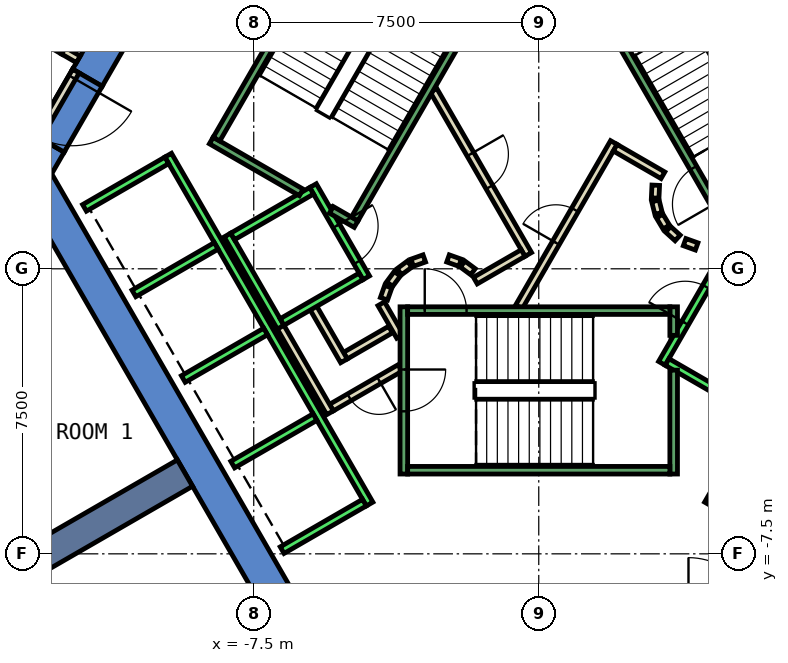
"""IFC4 building model, lengths in metres.
Left out: names, types, materials, properties, quantities, classifications, styles, units other than length and angle.
Written with IfcOpenShell. Run it as: python <this file> out.ifc"""

import sys

from ifc_helpers import new_model, si_unit, direction, frame, frame_2d, origin, place, context, subcontext, project, spatial, polyline, rectangle, outline, extrude, element, fill, save


model = new_model("IFC4")
c1 = context("Model", 3, precision=1e-05, world=origin(), true_north=direction((0.0, 1.0)))
c2 = subcontext(c1, "Body", "Model", "MODEL_VIEW")
j1 = project(units=[si_unit("LENGTHUNIT", "METRE"), si_unit("PLANEANGLEUNIT", "RADIAN")], contexts=[c1])
p1 = place(None, origin())
s1 = spatial("IfcSite", under=j1, at=p1, CompositionType="ELEMENT")
p2 = place(p1, origin())
s2 = spatial("IfcBuilding", under=s1, at=p2, CompositionType="ELEMENT")
p3 = place(p2, frame((0.0, 0.0, 86.6)))
s3 = spatial("IfcBuildingStorey", under=s2, at=p3, CompositionType="ELEMENT", Elevation=86.6)
p4 = place(p3, frame((0.0, 0.0, -0.6)))
e1 = element("IfcWall", 1, at=p4, inside=s3, PredefinedType="SHEAR", context=c2, shape_type="SweptSolid", body=[
    extrude(outline(polyline([(-12.267, 5.252), (-11.488, 4.802), (-6.409, 13.6), (-6.928, 14.5), (-12.267, 5.252)])), origin(), (0.0, 0.0, 1.0), 4.4),
])
p5 = place(p3, frame((0.0, 0.0, -0.6)))
e2 = element("IfcWall", 2, at=p5, inside=s3, PredefinedType="SHEAR", context=c2, shape_type="SweptSolid", body=[
    extrude(outline(polyline([(-12.488, 3.07), (-13.267, 3.52), (-13.856, 2.5), (-12.817, 2.5), (-12.488, 3.07)])), origin(), (0.0, 0.0, 1.0), 4.4),
])
p6 = place(p3, frame((0.0, 0.0, 3.6)))
e3 = element("IfcWall", 3, at=p6, inside=s3, PredefinedType="SHEAR", context=c2, shape_type="SweptSolid", body=[
    extrude(outline(polyline([(-13.267, 3.52), (-12.488, 3.07), (-11.488, 4.802), (-12.267, 5.252), (-13.267, 3.52)])), origin(), (0.0, 0.0, 1.0), 0.2),
])
p7 = place(p3, frame((0.0, 0.0, -0.6)))
e4 = element("IfcWall", 4, at=p7, inside=s3, PredefinedType="SHEAR", context=c2, shape_type="SweptSolid", body=[
    extrude(outline(polyline([(-13.856, 2.5), (-6.928, -9.5), (-6.409, -8.6), (-12.817, 2.5), (-13.856, 2.5)])), origin(), (0.0, 0.0, 1.0), 4.4),
])
p8 = place(p3, frame((-9.31, -5.375, -0.6), z_axis=(0.0, 0.0, 1.0), x_axis=(-0.866017533419, -0.500013631625, 0.0)))
e5 = element("IfcWall", 5, at=p8, inside=s3, PredefinedType="SHEAR", context=c2, shape_type="SweptSolid", body=[
    extrude(rectangle(XDim=9.0, YDim=0.8, at=frame_2d((4.5, 0.0))), origin(), (0.0, 0.0, 1.0), 4.4),
])
p9 = place(p3, frame((-15.098, 7.233, 0.0), z_axis=(0.0, 0.0, 1.0), x_axis=(0.866101363304, -0.499868411168, 0.0)))
e6 = element("IfcWall", 6, at=p9, inside=s3, PredefinedType="PARTITIONING", context=c2, shape_type="SweptSolid", body=[
    extrude(rectangle(XDim=2.992, YDim=0.2, at=frame_2d((1.496, 0.0))), origin(), (0.0, 0.0, 1.0), 3.8),
])
p10 = place(p3, frame((-3.9, -1.599, 0.0), z_axis=(0.0, 0.0, 1.0), x_axis=(-0.865969445389, -0.500096910261, 0.0)))
e7 = element("IfcWall", 7, at=p10, inside=s3, PredefinedType="PARTITIONING", context=c2, shape_type="SweptSolid", body=[
    extrude(rectangle(XDim=1.373, YDim=0.2, at=frame_2d((0.687, 0.0))), origin(), (0.0, 0.0, 1.0), 3.8),
])
p11 = place(p3, frame((-5.126, -2.422, 0.0), z_axis=(0.0, 0.0, 1.0), x_axis=(-0.500062241894, 0.865989465428, 0.0)))
e8 = element("IfcWall", 8, at=p11, inside=s3, PredefinedType="PARTITIONING", context=c2, shape_type="SweptSolid", body=[
    extrude(rectangle(XDim=1.7, YDim=0.2, at=frame_2d((0.85, 0.0))), origin(), (0.0, 0.0, 1.0), 3.8),
])
p12 = place(p3, frame((-3.65, -2.61, 0.0), z_axis=(0.0, 0.0, 1.0), x_axis=(-0.866072462134, -0.499918483688, 0.0)))
e9 = element("IfcWall", 9, at=p12, inside=s3, PredefinedType="PARTITIONING", context=c2, shape_type="SweptSolid", body=[
    extrude(rectangle(XDim=2.084, YDim=0.2, at=frame_2d((1.042, 0.0))), origin(), (0.0, 0.0, 1.0), 3.8),
])
p13 = place(p12, frame((0.642, 0.0, 0.0)))
e10 = element("IfcOpeningElement", 10, at=p13, cuts=e9, PredefinedType="OPENING", context=c2, shape_type="SweptSolid", body=[
    extrude(rectangle(XDim=0.9, YDim=2.1, at=frame_2d((0.45, 1.05))), frame((0.0, 0.11, 0.0), z_axis=(0.0, -1.0, 0.0), x_axis=(1.0, 0.0, 0.0)), (0.0, 0.0, 1.0), 0.22),
])
p14 = place(p3, frame((-5.492, -3.788, 0.0), z_axis=(0.0, 0.0, 1.0), x_axis=(-0.500008949224, 0.866020236886, 0.0)))
e11 = element("IfcWall", 11, at=p14, inside=s3, PredefinedType="PARTITIONING", context=c2, shape_type="SweptSolid", body=[
    extrude(rectangle(XDim=2.68, YDim=0.2, at=frame_2d((1.34, 0.0))), origin(), (0.0, 0.0, 1.0), 3.8),
])
p15 = place(p3, frame((-4.145, -0.92, 0.0), z_axis=(0.0, 0.0, 1.0), x_axis=(0.499743786207, -0.866173278362, 0.0)))
e12 = element("IfcWall", 12, at=p15, inside=s3, PredefinedType="PARTITIONING", context=c2, shape_type="SweptSolid", body=[
    extrude(rectangle(XDim=0.991, YDim=0.2, at=frame_2d((0.495, 0.0))), origin(), (0.0, 0.0, 1.0), 3.8),
])
p16 = place(p3, frame((-0.52, -1.0, 0.0), z_axis=(0.0, 0.0, 1.0), x_axis=(0.50011622646, 0.865958290007, 0.0)))
e13 = element("IfcWall", 13, at=p16, inside=s3, PredefinedType="PARTITIONING", context=c2, shape_type="SweptSolid", body=[
    extrude(rectangle(XDim=4.991, YDim=0.2, at=frame_2d((2.496, 0.0))), origin(), (0.0, 0.0, 1.0), 3.8),
])
p17 = place(p16, frame((1.945, 0.0, 0.0)))
e14 = element("IfcOpeningElement", 14, at=p17, cuts=e13, PredefinedType="OPENING", context=c2, shape_type="SweptSolid", body=[
    extrude(rectangle(XDim=1.0, YDim=2.1, at=frame_2d((0.5, 1.05))), frame((0.0, 0.11, 0.0), z_axis=(0.0, -1.0, 0.0), x_axis=(1.0, 0.0, 0.0)), (0.0, 0.0, 1.0), 0.22),
])
p18 = place(p3, frame((2.012, 3.186, 0.0), z_axis=(0.0, 0.0, 1.0), x_axis=(0.865891012941, -0.500232699559, 0.0)))
e15 = element("IfcWall", 15, at=p18, inside=s3, PredefinedType="PARTITIONING", context=c2, shape_type="SweptSolid", body=[
    extrude(rectangle(XDim=1.449, YDim=0.2, at=frame_2d((0.725, 0.0))), origin(), (0.0, 0.0, 1.0), 3.8),
])
p19 = place(p3, frame((3.079, 2.199, 0.0), z_axis=(0.0, 0.0, 1.0), x_axis=(-0.047771483479, -0.998858290933, 0.0)))
e16 = element("IfcWall", 16, at=p19, inside=s3, PredefinedType="PARTITIONING", context=c2, shape_type="SweptSolid", body=[
    extrude(rectangle(XDim=0.337, YDim=0.2, at=frame_2d((0.169, 0.0))), origin(), (0.0, 0.0, 1.0), 3.8),
])
p20 = place(p3, frame((3.07, 1.786, 0.0), z_axis=(0.0, 0.0, 1.0), x_axis=(0.242705583207, -0.970099994784, 0.0)))
e17 = element("IfcWall", 17, at=p20, inside=s3, PredefinedType="PARTITIONING", context=c2, shape_type="SweptSolid", body=[
    extrude(rectangle(XDim=0.338, YDim=0.2, at=frame_2d((0.169, 0.0))), origin(), (0.0, 0.0, 1.0), 3.8),
])
for number, where, z_axis, x_axis in (
    (18, (3.182, 1.388, 0.0), (0.0, 0.0, 1.0), (0.512, -0.859, 0.0)),
    (19, (3.404, 1.039, 0.0), (0.0, 0.0, 1.0), (0.74, -0.672, 0.0)),
):
    element("IfcWall", number, at=place(p3, frame(where, z_axis=z_axis, x_axis=x_axis)), inside=s3, PredefinedType="PARTITIONING", context=c2, shape_type="SweptSolid", body=[
        extrude(rectangle(XDim=0.338, YDim=0.2, at=frame_2d((0.169, 0.0))), origin(), (0.0, 0.0, 1.0), 3.8),
    ])
p21 = place(p3, frame((3.838, 0.702, 0.0), z_axis=(0.0, 0.0, 1.0), x_axis=(0.941035081519, -0.338308993895, 0.0)))
e20 = element("IfcWall", 20, at=p21, inside=s3, PredefinedType="PARTITIONING", context=c2, shape_type="SweptSolid", body=[
    extrude(rectangle(XDim=0.337, YDim=0.2, at=frame_2d((0.168, 0.0))), origin(), (0.0, 0.0, 1.0), 3.8),
])
p22 = place(p3, frame((-2.771, 4.7, 0.0), z_axis=(0.0, 0.0, 1.0), x_axis=(0.499969479948, -0.866043023828, 0.0)))
e21 = element("IfcWall", 21, at=p22, inside=s3, PredefinedType="PARTITIONING", context=c2, shape_type="SweptSolid", body=[
    extrude(rectangle(XDim=4.99, YDim=0.2, at=frame_2d((2.495, 0.0))), origin(), (0.0, 0.0, 1.0), 3.8),
])
p23 = place(p22, frame((1.945, 0.0, 0.0)))
e22 = element("IfcOpeningElement", 22, at=p23, cuts=e21, PredefinedType="OPENING", context=c2, shape_type="SweptSolid", body=[
    extrude(rectangle(XDim=1.0, YDim=2.1, at=frame_2d((0.5, 1.05))), frame((0.0, 0.11, 0.0), z_axis=(0.0, -1.0, 0.0), x_axis=(1.0, 0.0, 0.0)), (0.0, 0.0, 1.0), 0.22),
])
p24 = place(p3, frame((-0.412, 0.414, 0.0), z_axis=(0.0, 0.0, 1.0), x_axis=(-0.866017369001, -0.500013916395, 0.0)))
e23 = element("IfcWall", 23, at=p24, inside=s3, PredefinedType="PARTITIONING", context=c2, shape_type="SweptSolid", body=[
    extrude(rectangle(XDim=1.45, YDim=0.2, at=frame_2d((0.725, 0.0))), origin(), (0.0, 0.0, 1.0), 3.8),
])
p25 = place(p3, frame((-1.731, -0.077, 0.0), z_axis=(0.0, 0.0, 1.0), x_axis=(-0.804311165252, 0.594208338422, 0.0)))
e24 = element("IfcWall", 24, at=p25, inside=s3, PredefinedType="PARTITIONING", context=c2, shape_type="SweptSolid", body=[
    extrude(rectangle(XDim=0.338, YDim=0.2, at=frame_2d((0.169, 0.0))), origin(), (0.0, 0.0, 1.0), 3.8),
])
p26 = place(p3, frame((-2.07, 0.16, 0.0), z_axis=(0.0, 0.0, 1.0), x_axis=(-0.942199461132, 0.335052496547, 0.0)))
e25 = element("IfcWall", 25, at=p26, inside=s3, PredefinedType="PARTITIONING", context=c2, shape_type="SweptSolid", body=[
    extrude(rectangle(XDim=0.337, YDim=0.2, at=frame_2d((0.169, 0.0))), origin(), (0.0, 0.0, 1.0), 3.8),
])
p27 = place(p3, frame((-3.012, 0.273, 0.0), z_axis=(0.0, 0.0, 1.0), x_axis=(-0.942280615813, -0.334824194261, 0.0)))
e26 = element("IfcWall", 26, at=p27, inside=s3, PredefinedType="PARTITIONING", context=c2, shape_type="SweptSolid", body=[
    extrude(rectangle(XDim=0.338, YDim=0.2, at=frame_2d((0.169, 0.0))), origin(), (0.0, 0.0, 1.0), 3.8),
])
p28 = place(p3, frame((-3.397, 0.124, 0.0), z_axis=(0.0, 0.0, 1.0), x_axis=(-0.804311165252, -0.594208338422, 0.0)))
e27 = element("IfcWall", 27, at=p28, inside=s3, PredefinedType="PARTITIONING", context=c2, shape_type="SweptSolid", body=[
    extrude(rectangle(XDim=0.338, YDim=0.2, at=frame_2d((0.169, 0.0))), origin(), (0.0, 0.0, 1.0), 3.8),
])
p29 = place(p3, frame((-3.723, -0.131, 0.0), z_axis=(0.0, 0.0, 1.0), x_axis=(-0.594675113454, -0.803966112121, 0.0)))
e28 = element("IfcWall", 28, at=p29, inside=s3, PredefinedType="PARTITIONING", context=c2, shape_type="SweptSolid", body=[
    extrude(rectangle(XDim=0.338, YDim=0.2, at=frame_2d((0.169, 0.0))), origin(), (0.0, 0.0, 1.0), 3.8),
])
p30 = place(p3, frame((-3.96, -0.47, 0.0), z_axis=(0.0, 0.0, 1.0), x_axis=(-0.334824194261, -0.942280615813, 0.0)))
e29 = element("IfcWall", 29, at=p30, inside=s3, PredefinedType="PARTITIONING", context=c2, shape_type="SweptSolid", body=[
    extrude(rectangle(XDim=0.338, YDim=0.2, at=frame_2d((0.169, 0.0))), origin(), (0.0, 0.0, 1.0), 3.8),
])
p31 = place(p3, frame((-12.18, 5.202, 0.0), z_axis=(0.0, 0.0, 1.0), x_axis=(-0.50002537861, -0.866010750942, 0.0)))
e30 = element("IfcWall", 30, at=p31, inside=s3, PredefinedType="PARTITIONING", context=c2, shape_type="SweptSolid", body=[
    extrude(rectangle(XDim=2.0, YDim=0.2, at=frame_2d((1.0, 0.0))), origin(), (0.0, 0.0, 1.0), 2.4),
])
p32 = place(p31, frame((0.19, 0.0, 0.0)))
e31 = element("IfcOpeningElement", 31, at=p32, cuts=e30, PredefinedType="OPENING", context=c2, shape_type="SweptSolid", body=[
    extrude(rectangle(XDim=1.8, YDim=2.1, at=frame_2d((0.9, 1.05))), frame((0.0, 0.11, 0.0), z_axis=(0.0, -1.0, 0.0), x_axis=(1.0, 0.0, 0.0)), (0.0, 0.0, 1.0), 0.22),
])
p33 = place(p3, frame((-12.506, 5.737, 0.0), z_axis=(0.0, 0.0, 1.0), x_axis=(0.865624510465, -0.500693725627, 0.0)))
e32 = element("IfcWall", 32, at=p33, inside=s3, PredefinedType="PARTITIONING", context=c2, shape_type="SweptSolid", body=[
    extrude(rectangle(XDim=0.449, YDim=0.2, at=frame_2d((0.225, 0.0))), origin(), (0.0, 0.0, 1.0), 2.4),
])
p34 = place(p3, frame((-5.94, 2.188, 0.0), z_axis=(0.0, 0.0, 1.0), x_axis=(0.49994636267, -0.866056369097, 0.0)))
e33 = element("IfcWall", 33, at=p34, inside=s3, PredefinedType="STANDARD", context=c2, shape_type="SweptSolid", body=[
    extrude(rectangle(XDim=2.8, YDim=0.2, at=frame_2d((1.4, 0.0))), origin(), (0.0, 0.0, 1.0), 3.8),
])
p35 = place(p34, frame((1.225, 0.0, 0.0)))
e34 = element("IfcOpeningElement", 34, at=p35, cuts=e33, PredefinedType="OPENING", context=c2, shape_type="SweptSolid", body=[
    extrude(rectangle(XDim=1.1, YDim=2.1, at=frame_2d((0.55, 1.05))), frame((0.0, 0.11, 0.0), z_axis=(0.0, -1.0, 0.0), x_axis=(1.0, 0.0, 0.0)), (0.0, 0.0, 1.0), 0.22),
])
p36 = place(p3, frame((-8.192, 0.888, 0.0), z_axis=(0.0, 0.0, 1.0), x_axis=(0.49994636267, -0.866056369097, 0.0)))
e35 = element("IfcWall", 35, at=p36, inside=s3, PredefinedType="STANDARD", context=c2, shape_type="SweptSolid", body=[
    extrude(rectangle(XDim=2.8, YDim=0.2, at=frame_2d((1.4, 0.0))), origin(), (0.0, 0.0, 1.0), 3.8),
])
for number, where, z_axis, x_axis in (
    (36, (-5.977, 2.052, 0.0), (0.0, 0.0, 1.0), (-0.866, -0.5, 0.0)),
    (37, (-4.677, -0.2, 0.0), (0.0, 0.0, 1.0), (-0.866, -0.5, 0.0)),
):
    element("IfcWall", number, at=place(p3, frame(where, z_axis=z_axis, x_axis=x_axis)), inside=s3, PredefinedType="STANDARD", context=c2, shape_type="SweptSolid", body=[
        extrude(rectangle(XDim=2.399, YDim=0.2, at=frame_2d((1.2, 0.0))), origin(), (0.0, 0.0, 1.0), 3.8),
    ])
p37 = place(p3, frame((-9.751, 2.99, 0.0), z_axis=(0.0, 0.0, 1.0), x_axis=(0.50000090737, -0.866024879913, 0.0)))
e38 = element("IfcWall", 38, at=p37, inside=s3, PredefinedType="STANDARD", context=c2, shape_type="SweptSolid", body=[
    extrude(rectangle(XDim=10.6, YDim=0.2, at=frame_2d((5.3, 0.0))), origin(), (0.0, 0.0, 1.0), 3.8),
])
p38 = place(p3, frame((-9.788, 2.853, 0.0), z_axis=(0.0, 0.0, 1.0), x_axis=(-0.865998541277, -0.500046524342, 0.0)))
e39 = element("IfcWall", 39, at=p38, inside=s3, PredefinedType="STANDARD", context=c2, shape_type="SweptSolid", body=[
    extrude(rectangle(XDim=2.5, YDim=0.2, at=frame_2d((1.25, 0.0))), origin(), (0.0, 0.0, 1.0), 3.8),
])
for number, where, z_axis, x_axis in (
    (40, (-8.488, 0.602, 0.0), (0.0, 0.0, 1.0), (-0.866, -0.5, 0.0)),
    (41, (-7.188, -1.65, 0.0), (0.0, 0.0, 1.0), (-0.866, -0.5, 0.0)),
    (42, (-5.888, -3.902, 0.0), (0.0, 0.0, 1.0), (-0.866, -0.5, 0.0)),
    (43, (-4.588, -6.153, 0.0), (0.0, 0.0, 1.0), (-0.866, -0.5, 0.0)),
):
    element("IfcWall", number, at=place(p3, frame(where, z_axis=z_axis, x_axis=x_axis)), inside=s3, PredefinedType="STANDARD", context=c2, shape_type="SweptSolid", body=[
        extrude(rectangle(XDim=2.5, YDim=0.2, at=frame_2d((1.25, 0.0))), origin(), (0.0, 0.0, 1.0), 3.8),
    ])
p39 = place(p3, frame((3.24, -2.488, 0.0), z_axis=(0.0, 0.0, 1.0), x_axis=(0.49994636267, 0.866056369097, 0.0)))
e44 = element("IfcWall", 44, at=p39, inside=s3, PredefinedType="STANDARD", context=c2, shape_type="SweptSolid", body=[
    extrude(rectangle(XDim=2.8, YDim=0.2, at=frame_2d((1.4, 0.0))), origin(), (0.0, 0.0, 1.0), 3.8),
])
p40 = place(p39, frame((1.225, 0.0, 0.0)))
e45 = element("IfcOpeningElement", 45, at=p40, cuts=e44, PredefinedType="OPENING", context=c2, shape_type="SweptSolid", body=[
    extrude(rectangle(XDim=1.1, YDim=2.1, at=frame_2d((0.55, 1.05))), frame((0.0, 0.11, 0.0), z_axis=(0.0, -1.0, 0.0), x_axis=(1.0, 0.0, 0.0)), (0.0, 0.0, 1.0), 0.22),
])
p41 = place(p3, frame((3.377, -2.452, 0.0), z_axis=(0.0, 0.0, 1.0), x_axis=(0.865955154139, -0.50012165622, 0.0)))
e46 = element("IfcWall", 46, at=p41, inside=s3, PredefinedType="STANDARD", context=c2, shape_type="SweptSolid", body=[
    extrude(rectangle(XDim=2.4, YDim=0.2, at=frame_2d((1.2, 0.0))), origin(), (0.0, 0.0, 1.0), 3.8),
])
p42 = place(p3, frame((4.451, -6.19, 0.0), z_axis=(0.0, 0.0, 1.0), x_axis=(0.50000090737, 0.866024879913, 0.0)))
e47 = element("IfcWall", 47, at=p42, inside=s3, PredefinedType="STANDARD", context=c2, shape_type="SweptSolid", body=[
    extrude(rectangle(XDim=10.6, YDim=0.2, at=frame_2d((5.3, 0.0))), origin(), (0.0, 0.0, 1.0), 3.8),
])
p43 = place(p3, frame((-3.55, -1.0, 0.0), z_axis=(0.0, 0.0, 1.0), x_axis=(0.0, -1.0, 0.0)))
e48 = element("IfcWall", 48, at=p43, inside=s3, PredefinedType="STANDARD", context=c2, shape_type="SweptSolid", body=[
    extrude(rectangle(XDim=4.4, YDim=0.2, at=frame_2d((2.2, 0.0))), origin(), (0.0, 0.0, 1.0), 3.8),
])
p44 = place(p43, frame((1.65, 0.0, 0.0)))
e49 = element("IfcOpeningElement", 49, at=p44, cuts=e48, PredefinedType="OPENING", context=c2, shape_type="SweptSolid", body=[
    extrude(rectangle(XDim=1.1, YDim=2.2, at=frame_2d((0.55, 1.1))), frame((0.0, 0.11, 0.0), z_axis=(0.0, -1.0, 0.0), x_axis=(1.0, 0.0, 0.0)), (0.0, 0.0, 1.0), 0.22),
])
p45 = place(p3, frame((3.55, -2.667, 0.0), z_axis=(0.0, 0.0, 1.0), x_axis=(0.0, -1.0, 0.0)))
e50 = element("IfcWall", 50, at=p45, inside=s3, PredefinedType="STANDARD", context=c2, shape_type="SweptSolid", body=[
    extrude(rectangle(XDim=2.733, YDim=0.2, at=frame_2d((1.366, 0.0))), origin(), (0.0, 0.0, 1.0), 3.8),
])
p46 = place(p3, frame((3.55, -1.0, 0.0), z_axis=(0.0, 0.0, 1.0), x_axis=(0.0, -1.0, 0.0)))
e51 = element("IfcWall", 51, at=p46, inside=s3, PredefinedType="STANDARD", context=c2, shape_type="SweptSolid", body=[
    extrude(rectangle(XDim=0.751, YDim=0.2, at=frame_2d((0.375, 0.0))), origin(), (0.0, 0.0, 1.0), 3.8),
])
p47 = place(p3, frame((-3.45, -1.1, 0.0), z_axis=(0.0, 0.0, 1.0), x_axis=(1.0, 0.0, 0.0)))
e52 = element("IfcWall", 52, at=p47, inside=s3, PredefinedType="STANDARD", context=c2, shape_type="SweptSolid", body=[
    extrude(rectangle(XDim=6.9, YDim=0.2, at=frame_2d((3.45, 0.0))), origin(), (0.0, 0.0, 1.0), 3.8),
])
p48 = place(p47, frame((0.45, 0.0, 0.0)))
e53 = element("IfcOpeningElement", 53, at=p48, cuts=e52, PredefinedType="OPENING", context=c2, shape_type="SweptSolid", body=[
    extrude(rectangle(XDim=1.1, YDim=2.2, at=frame_2d((0.55, 1.1))), frame((0.0, 0.11, 0.0), z_axis=(0.0, -1.0, 0.0), x_axis=(1.0, 0.0, 0.0)), (0.0, 0.0, 1.0), 0.22),
])
p49 = place(p3, frame((-3.45, -5.3, 0.0), z_axis=(0.0, 0.0, 1.0), x_axis=(1.0, 0.0, 0.0)))
e54 = element("IfcWall", 54, at=p49, inside=s3, PredefinedType="STANDARD", context=c2, shape_type="SweptSolid", body=[
    extrude(rectangle(XDim=6.9, YDim=0.2, at=frame_2d((3.45, 0.0))), origin(), (0.0, 0.0, 1.0), 3.8),
])
p50 = place(p3, frame((4.843, 1.312, 0.0), z_axis=(0.0, 0.0, 1.0), x_axis=(-0.499963383562, 0.866046543262, 0.0)))
e55 = element("IfcWall", 55, at=p50, inside=s3, PredefinedType="STANDARD", context=c2, shape_type="SweptSolid", body=[
    extrude(rectangle(XDim=6.9, YDim=0.2, at=frame_2d((3.45, 0.0))), origin(), (0.0, 0.0, 1.0), 3.8),
])
p51 = place(p50, frame((0.45, 0.0, 0.0)))
e56 = element("IfcOpeningElement", 56, at=p51, cuts=e55, PredefinedType="OPENING", context=c2, shape_type="SweptSolid", body=[
    extrude(rectangle(XDim=1.1, YDim=2.2, at=frame_2d((0.55, 1.1))), frame((0.0, 0.11, 0.0), z_axis=(0.0, -1.0, 0.0), x_axis=(1.0, 0.0, 0.0)), (0.0, 0.0, 1.0), 0.22),
])
p52 = place(p3, frame((-6.25, 2.01, 0.0), z_axis=(0.0, 0.0, 1.0), x_axis=(-0.86611865017, 0.499838457731, 0.0)))
e57 = element("IfcWall", 57, at=p52, inside=s3, PredefinedType="STANDARD", context=c2, shape_type="SweptSolid", body=[
    extrude(rectangle(XDim=2.733, YDim=0.2, at=frame_2d((1.366, 0.0))), origin(), (0.0, 0.0, 1.0), 3.8),
])
p53 = place(p3, frame((-4.806, 1.176, 0.0), z_axis=(0.0, 0.0, 1.0), x_axis=(-0.866558586415, 0.499075361355, 0.0)))
e58 = element("IfcWall", 58, at=p53, inside=s3, PredefinedType="STANDARD", context=c2, shape_type="SweptSolid", body=[
    extrude(rectangle(XDim=0.751, YDim=0.2, at=frame_2d((0.376, 0.0))), origin(), (0.0, 0.0, 1.0), 3.8),
])
p54 = place(p3, frame((-1.393, 7.288, 0.0), z_axis=(0.0, 0.0, 1.0), x_axis=(-0.499963383562, -0.866046543262, 0.0)))
e59 = element("IfcWall", 59, at=p54, inside=s3, PredefinedType="STANDARD", context=c2, shape_type="SweptSolid", body=[
    extrude(rectangle(XDim=6.9, YDim=0.2, at=frame_2d((3.45, 0.0))), origin(), (0.0, 0.0, 1.0), 3.8),
])
p55 = place(p54, frame((0.45, 0.0, 0.0)))
e60 = element("IfcOpeningElement", 60, at=p55, cuts=e59, PredefinedType="OPENING", context=c2, shape_type="SweptSolid", body=[
    extrude(rectangle(XDim=1.1, YDim=2.2, at=frame_2d((0.55, 1.1))), frame((0.0, 0.11, 0.0), z_axis=(0.0, -1.0, 0.0), x_axis=(1.0, 0.0, 0.0)), (0.0, 0.0, 1.0), 0.22),
])
p56 = place(p3, frame((-5.03, 9.388, 0.0), z_axis=(0.0, 0.0, 1.0), x_axis=(-0.499978703459, -0.866037698999, 0.0)))
e61 = element("IfcWall", 61, at=p56, inside=s3, PredefinedType="STANDARD", context=c2, shape_type="SweptSolid", body=[
    extrude(rectangle(XDim=6.9, YDim=0.2, at=frame_2d((3.45, 0.0))), origin(), (0.0, 0.0, 1.0), 3.8),
])
p57 = place(p17, origin())
e62 = element("IfcDoor", 62, at=p57, inside=s3, OperationType="SINGLE_SWING_LEFT", PredefinedType="DOOR", context=c2, shape_type="SweptSolid", body=[
    extrude(rectangle(XDim=1.0, YDim=2.1, at=frame_2d((0.5, 1.05))), frame((0.0, 0.025, 0.0), z_axis=(0.0, -1.0, 0.0), x_axis=(1.0, 0.0, 0.0)), (0.0, 0.0, 1.0), 0.05),
])
fill(e14, e62)
p58 = place(p23, origin())
e63 = element("IfcDoor", 63, at=p58, inside=s3, OperationType="SINGLE_SWING_RIGHT", PredefinedType="DOOR", context=c2, shape_type="SweptSolid", body=[
    extrude(rectangle(XDim=1.0, YDim=2.1, at=frame_2d((0.5, 1.05))), frame((0.0, 0.025, 0.0), z_axis=(0.0, -1.0, 0.0), x_axis=(1.0, 0.0, 0.0)), (0.0, 0.0, 1.0), 0.05),
])
fill(e22, e63)
p59 = place(p13, origin())
e64 = element("IfcDoor", 64, at=p59, inside=s3, OperationType="SINGLE_SWING_LEFT", PredefinedType="DOOR", context=c2, shape_type="SweptSolid", body=[
    extrude(rectangle(XDim=0.9, YDim=2.1, at=frame_2d((0.45, 1.05))), frame((0.0, 0.025, 0.0), z_axis=(0.0, -1.0, 0.0), x_axis=(1.0, 0.0, 0.0)), (0.0, 0.0, 1.0), 0.05),
])
fill(e10, e64)
p60 = place(p32, origin())
e65 = element("IfcDoor", 65, at=p60, inside=s3, OperationType="DOUBLE_DOOR_SINGLE_SWING", PredefinedType="DOOR", context=c2, shape_type="SweptSolid", body=[
    extrude(rectangle(XDim=1.8, YDim=2.1, at=frame_2d((0.9, 1.05))), frame((0.0, 0.025, 0.0), z_axis=(0.0, -1.0, 0.0), x_axis=(1.0, 0.0, 0.0)), (0.0, 0.0, 1.0), 0.05),
])
fill(e31, e65)
p61 = place(p40, origin())
e66 = element("IfcDoor", 66, at=p61, inside=s3, OperationType="SLIDING_TO_LEFT", PredefinedType="DOOR", context=c2, shape_type="SweptSolid", body=[
    extrude(rectangle(XDim=1.1, YDim=2.1, at=frame_2d((0.55, 1.05))), frame((0.0, 0.025, 0.0), z_axis=(0.0, -1.0, 0.0), x_axis=(1.0, 0.0, 0.0)), (0.0, 0.0, 1.0), 0.05),
])
fill(e45, e66)
p62 = place(p35, origin())
e67 = element("IfcDoor", 67, at=p62, inside=s3, OperationType="SLIDING_TO_LEFT", PredefinedType="DOOR", context=c2, shape_type="SweptSolid", body=[
    extrude(rectangle(XDim=1.1, YDim=2.1, at=frame_2d((0.55, 1.05))), frame((0.0, 0.025, 0.0), z_axis=(0.0, -1.0, 0.0), x_axis=(1.0, 0.0, 0.0)), (0.0, 0.0, 1.0), 0.05),
])
fill(e34, e67)
p63 = place(p48, origin())
e68 = element("IfcDoor", 68, at=p63, inside=s3, OperationType="SINGLE_SWING_LEFT", PredefinedType="DOOR", context=c2, shape_type="SweptSolid", body=[
    extrude(rectangle(XDim=1.1, YDim=2.2, at=frame_2d((0.55, 1.1))), frame((0.0, 0.025, 0.0), z_axis=(0.0, -1.0, 0.0), x_axis=(1.0, 0.0, 0.0)), (0.0, 0.0, 1.0), 0.05),
])
fill(e53, e68)
p64 = place(p44, origin())
e69 = element("IfcDoor", 69, at=p64, inside=s3, OperationType="SINGLE_SWING_LEFT", PredefinedType="DOOR", context=c2, shape_type="SweptSolid", body=[
    extrude(rectangle(XDim=1.1, YDim=2.2, at=frame_2d((0.55, 1.1))), frame((0.0, 0.025, 0.0), z_axis=(0.0, -1.0, 0.0), x_axis=(1.0, 0.0, 0.0)), (0.0, 0.0, 1.0), 0.05),
])
fill(e49, e69)
p65 = place(p51, origin())
e70 = element("IfcDoor", 70, at=p65, inside=s3, OperationType="SINGLE_SWING_LEFT", PredefinedType="DOOR", context=c2, shape_type="SweptSolid", body=[
    extrude(rectangle(XDim=1.1, YDim=2.2, at=frame_2d((0.55, 1.1))), frame((0.0, 0.025, 0.0), z_axis=(0.0, -1.0, 0.0), x_axis=(1.0, 0.0, 0.0)), (0.0, 0.0, 1.0), 0.05),
])
fill(e56, e70)
save(model, sys.argv[1])
